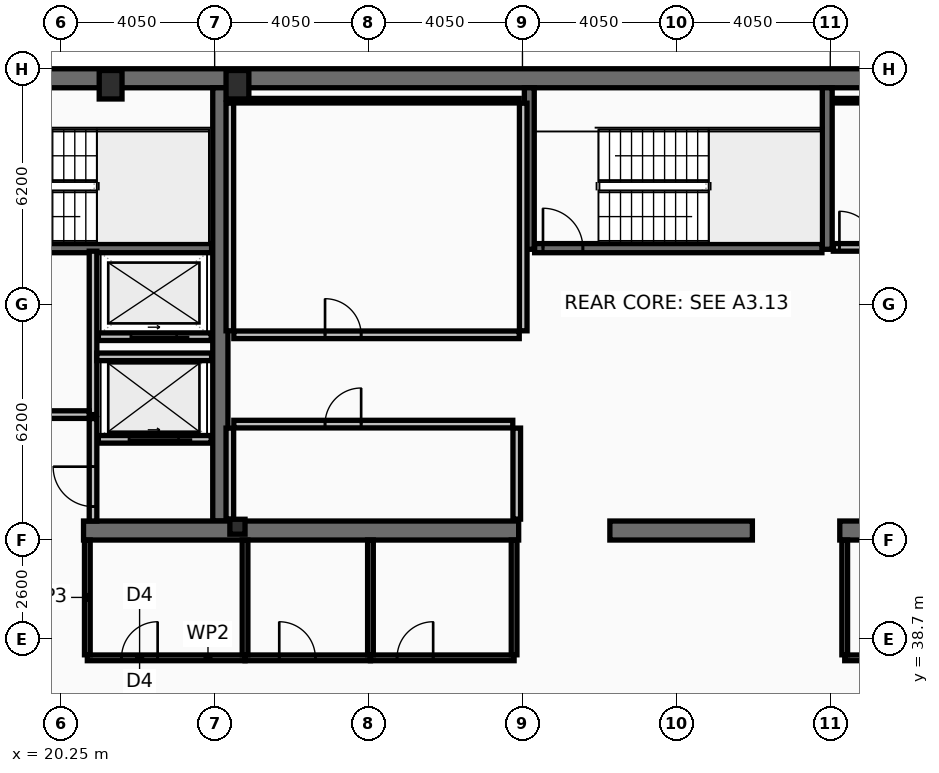
"""IFC4 building model, lengths in metres.
Left out: names, types, materials, properties, quantities, classifications, styles, units other than length and angle.
Written with IfcOpenShell. Run it as: python <this file> out.ifc"""

import sys

from ifc_helpers import new_model, si_unit, direction, frame, frame_2d, origin, origin_2d, place, context, subcontext, project, spatial, rectangle, hollow_rectangle, i_section, extrude, element, fill, save


model = new_model("IFC4")
c1 = context("Model", 3, precision=1e-05, world=origin(), true_north=direction((0.0, 1.0)))
c2 = subcontext(c1, "Body", "Model", "MODEL_VIEW")
j1 = project(units=[si_unit("LENGTHUNIT", "METRE"), si_unit("PLANEANGLEUNIT", "RADIAN")], contexts=[c1])
p1 = place(None, origin())
s1 = spatial("IfcSite", under=j1, at=p1, CompositionType="ELEMENT")
p2 = place(p1, origin())
s2 = spatial("IfcBuilding", under=s1, at=p2, CompositionType="ELEMENT")
p3 = place(p2, frame((0.0, 0.0, 269.8)))
s3 = spatial("IfcBuildingStorey", under=s2, at=p3, CompositionType="ELEMENT", Elevation=269.8)
p4 = place(p3, frame((16.2, 53.45, 0.0), z_axis=(0.0, 0.0, 1.0), x_axis=(1.0, 0.0, 0.0)))
e1 = element("IfcWall", 1, at=p4, inside=s3, PredefinedType="SHEAR", context=c2, shape_type="SweptSolid", body=[
    extrude(rectangle(XDim=40.5, YDim=0.5, at=frame_2d((20.25, 0.0))), origin(), (0.0, 0.0, 1.0), 3.44),
])
p5 = place(p3, frame((24.45, 41.8, 0.0), z_axis=(0.0, 0.0, 1.0), x_axis=(0.0, 1.0, 0.0)))
e2 = element("IfcWall", 2, at=p5, inside=s3, PredefinedType="SHEAR", context=c2, shape_type="SweptSolid", body=[
    extrude(rectangle(XDim=11.4, YDim=0.4, at=frame_2d((5.7, 0.0))), origin(), (0.0, 0.0, 1.0), 3.44),
])
p6 = place(p3, frame((32.3, 41.55, 0.0), z_axis=(0.0, 0.0, 1.0), x_axis=(-1.0, 0.0, 0.0)))
e3 = element("IfcWall", 3, at=p6, inside=s3, PredefinedType="SHEAR", context=c2, shape_type="SweptSolid", body=[
    extrude(rectangle(XDim=11.45, YDim=0.5, at=frame_2d((5.725, 0.0))), origin(), (0.0, 0.0, 1.0), 3.44),
])
p7 = place(p3, frame((38.45, 41.55, 0.0), z_axis=(0.0, 0.0, 1.0), x_axis=(-1.0, 0.0, 0.0)))
e4 = element("IfcWall", 4, at=p7, inside=s3, PredefinedType="SHEAR", context=c2, shape_type="SweptSolid", body=[
    extrude(rectangle(XDim=3.75, YDim=0.5, at=frame_2d((1.875, 0.0))), origin(), (0.0, 0.0, 1.0), 3.44),
])
p8 = place(p3, frame((52.05, 41.55, 0.0), z_axis=(0.0, 0.0, 1.0), x_axis=(-1.0, 0.0, 0.0)))
e5 = element("IfcWall", 5, at=p8, inside=s3, PredefinedType="SHEAR", context=c2, shape_type="SweptSolid", body=[
    extrude(rectangle(XDim=11.3, YDim=0.5, at=frame_2d((5.65, 0.0))), origin(), (0.0, 0.0, 1.0), 3.44),
])
for number, where, z_axis, x_axis in (
    (6, (32.58, 48.95, 0.0), (0.0, 0.0, 1.0), (0.0, 1.0, 0.0)),
    (7, (40.42, 48.95, 0.0), (0.0, 0.0, 1.0), (0.0, 1.0, 0.0)),
):
    element("IfcWall", number, at=place(p3, frame(where, z_axis=z_axis, x_axis=x_axis)), inside=s3, PredefinedType="SHEAR", context=c2, shape_type="SweptSolid", body=[
        extrude(rectangle(XDim=4.25, YDim=0.26, at=frame_2d((2.125, 0.0))), origin(), (0.0, 0.0, 1.0), 3.44),
    ])
p9 = place(p3, frame((16.7, 48.98, 0.0), z_axis=(0.0, 0.0, 1.0), x_axis=(1.0, 0.0, 0.0)))
e8 = element("IfcWall", 8, at=p9, inside=s3, PredefinedType="SHEAR", context=c2, shape_type="SweptSolid", body=[
    extrude(rectangle(XDim=7.52, YDim=0.24, at=frame_2d((3.76, 0.0))), origin(), (0.0, 0.0, 1.0), 3.44),
])
p10 = place(p9, frame((0.22, 0.0, 0.0)))
e9 = element("IfcOpeningElement", 9, at=p10, cuts=e8, PredefinedType="OPENING", context=c2, shape_type="SweptSolid", body=[
    extrude(rectangle(XDim=1.05, YDim=2.15, at=frame_2d((0.525, 1.075))), frame((0.0, 0.13, 0.0), z_axis=(0.0, -1.0, 0.0), x_axis=(1.0, 0.0, 0.0)), (0.0, 0.0, 1.0), 0.26),
])
p11 = place(p3, frame((32.72, 48.98, 0.0), z_axis=(0.0, 0.0, 1.0), x_axis=(1.0, 0.0, 0.0)))
e10 = element("IfcWall", 10, at=p11, inside=s3, PredefinedType="SHEAR", context=c2, shape_type="SweptSolid", body=[
    extrude(rectangle(XDim=7.56, YDim=0.24, at=frame_2d((3.78, 0.0))), origin(), (0.0, 0.0, 1.0), 3.44),
])
p12 = place(p11, frame((0.22, 0.0, 0.0)))
e11 = element("IfcOpeningElement", 11, at=p12, cuts=e10, PredefinedType="OPENING", context=c2, shape_type="SweptSolid", body=[
    extrude(rectangle(XDim=1.05, YDim=2.15, at=frame_2d((0.525, 1.075))), frame((0.0, 0.13, 0.0), z_axis=(0.0, -1.0, 0.0), x_axis=(1.0, 0.0, 0.0)), (0.0, 0.0, 1.0), 0.26),
])
for number, where, z_axis, x_axis in (
    (12, (21.562, 53.28, 0.0), (0.0, 0.0, 1.0), (1.0, 0.0, 0.0)),
    (13, (24.9, 53.28, 0.0), (0.0, 0.0, 1.0), (1.0, 0.0, 0.0)),
):
    element("IfcColumn", number, at=place(p3, frame(where, z_axis=z_axis, x_axis=x_axis)), inside=s3, PredefinedType="COLUMN", context=c2, shape_type="SweptSolid", body=[
        extrude(hollow_rectangle(XDim=0.6, YDim=0.75, WallThickness=0.045, at=origin_2d()), origin(), (0.0, 0.0, 1.0), 3.6),
    ])
p13 = place(p3, frame((24.9, 41.65, 0.0), z_axis=(0.0, 0.0, 1.0), x_axis=(1.0, 0.0, 0.0)))
e14 = element("IfcColumn", 14, at=p13, inside=s3, PredefinedType="COLUMN", context=c2, shape_type="SweptSolid", body=[
    extrude(i_section(OverallWidth=0.399, OverallDepth=0.393, WebThickness=0.023, FlangeThickness=0.037, at=origin_2d()), origin(), (0.0, 0.0, 1.0), 3.6),
])
p14 = place(p3, frame((24.21, 43.95, 0.0), z_axis=(0.0, 0.0, 1.0), x_axis=(-1.0, 0.0, 0.0)))
e15 = element("IfcWall", 15, at=p14, inside=s3, PredefinedType="PARTITIONING", context=c2, shape_type="SweptSolid", body=[
    extrude(rectangle(XDim=2.97, YDim=0.2, at=frame_2d((1.485, 0.0))), origin(), (0.0, 0.0, 1.0), 3.44),
])
p15 = place(p14, frame((0.86, 0.0, 0.0)))
e16 = element("IfcOpeningElement", 16, at=p15, cuts=e15, PredefinedType="OPENING", context=c2, shape_type="SweptSolid", body=[
    extrude(rectangle(XDim=1.3, YDim=2.18, at=frame_2d((0.65, 1.09))), frame((0.0, 0.11, 0.0), z_axis=(0.0, -1.0, 0.0), x_axis=(1.0, 0.0, 0.0)), (0.0, 0.0, 1.0), 0.22),
])
p16 = place(p3, frame((24.21, 46.65, 0.0), z_axis=(0.0, 0.0, 1.0), x_axis=(-1.0, 0.0, 0.0)))
e17 = element("IfcWall", 17, at=p16, inside=s3, PredefinedType="PARTITIONING", context=c2, shape_type="SweptSolid", body=[
    extrude(rectangle(XDim=2.97, YDim=0.2, at=frame_2d((1.485, 0.0))), origin(), (0.0, 0.0, 1.0), 3.44),
])
p17 = place(p16, frame((0.91, 0.0, 0.0)))
e18 = element("IfcOpeningElement", 18, at=p17, cuts=e17, PredefinedType="OPENING", context=c2, shape_type="SweptSolid", body=[
    extrude(rectangle(XDim=1.2, YDim=2.18, at=frame_2d((0.6, 1.09))), frame((0.0, 0.11, 0.0), z_axis=(0.0, -1.0, 0.0), x_axis=(1.0, 0.0, 0.0)), (0.0, 0.0, 1.0), 0.22),
])
p18 = place(p3, frame((21.1, 44.6, 0.0), z_axis=(0.0, 0.0, 1.0), x_axis=(0.0, 1.0, 0.0)))
e19 = element("IfcWall", 19, at=p18, inside=s3, PredefinedType="PARTITIONING", context=c2, shape_type="SweptSolid", body=[
    extrude(rectangle(XDim=4.3, YDim=0.2, at=frame_2d((2.15, 0.0))), origin(), (0.0, 0.0, 1.0), 3.44),
])
p19 = place(p3, frame((16.7, 44.6, 0.0), z_axis=(0.0, 0.0, 1.0), x_axis=(1.0, 0.0, 0.0)))
e20 = element("IfcWall", 20, at=p19, inside=s3, PredefinedType="PARTITIONING", context=c2, shape_type="SweptSolid", body=[
    extrude(rectangle(XDim=4.3, YDim=0.2, at=frame_2d((2.15, 0.0))), origin(), (0.0, 0.0, 1.0), 3.44),
])
p20 = place(p19, frame((1.25, 0.0, 0.0)))
e21 = element("IfcOpeningElement", 21, at=p20, cuts=e20, PredefinedType="OPENING", context=c2, shape_type="SweptSolid", body=[
    extrude(rectangle(XDim=1.05, YDim=2.15, at=frame_2d((0.525, 1.075))), frame((0.0, 0.11, 0.0), z_axis=(0.0, -1.0, 0.0), x_axis=(1.0, 0.0, 0.0)), (0.0, 0.0, 1.0), 0.22),
])
p21 = place(p3, frame((21.2, 46.12, 0.0), z_axis=(0.0, 0.0, 1.0), x_axis=(1.0, 0.0, 0.0)))
e22 = element("IfcWall", 22, at=p21, inside=s3, PredefinedType="PARTITIONING", context=c2, shape_type="SweptSolid", body=[
    extrude(rectangle(XDim=3.02, YDim=0.2, at=frame_2d((1.51, 0.0))), origin(), (0.0, 0.0, 1.0), 3.44),
])
p22 = place(p3, frame((21.1, 41.8, 0.0), z_axis=(0.0, 0.0, 1.0), x_axis=(0.0, 1.0, 0.0)))
e23 = element("IfcWall", 23, at=p22, inside=s3, PredefinedType="PARTITIONING", context=c2, shape_type="SweptSolid", body=[
    extrude(rectangle(XDim=2.695, YDim=0.2, at=frame_2d((1.348, 0.0))), origin(), (0.0, 0.0, 1.0), 3.44),
])
p23 = place(p22, frame((0.38, 0.0, 0.0)))
e24 = element("IfcOpeningElement", 24, at=p23, cuts=e23, PredefinedType="OPENING", context=c2, shape_type="SweptSolid", body=[
    extrude(rectangle(XDim=1.05, YDim=2.15, at=frame_2d((0.525, 1.075))), frame((0.0, 0.11, 0.0), z_axis=(0.0, -1.0, 0.0), x_axis=(1.0, 0.0, 0.0)), (0.0, 0.0, 1.0), 0.22),
])
for number, where, z_axis, x_axis in (
    (25, (24.7, 46.805, 0.0), (0.0, 0.0, 1.0), (0.0, 1.0, 0.0)),
    (26, (32.42, 46.805, 0.0), (0.0, 0.0, 1.0), (0.0, 1.0, 0.0)),
):
    element("IfcWall", number, at=place(p3, frame(where, z_axis=z_axis, x_axis=x_axis)), inside=s3, PredefinedType="PARTITIONING", context=c2, shape_type="SweptSolid", body=[
        extrude(rectangle(XDim=5.99, YDim=0.2, at=frame_2d((2.995, 0.0))), origin(), (0.0, 0.0, 1.0), 3.44),
    ])
p24 = place(p3, frame((24.805, 52.86, 0.0), z_axis=(0.0, 0.0, 1.0), x_axis=(1.0, 0.0, 0.0)))
e27 = element("IfcWall", 27, at=p24, inside=s3, PredefinedType="PARTITIONING", context=c2, shape_type="SweptSolid", body=[
    extrude(rectangle(XDim=7.51, YDim=0.12, at=frame_2d((3.755, 0.0))), origin(), (0.0, 0.0, 1.0), 3.44),
])
p25 = place(p3, frame((24.805, 46.7, 0.0), z_axis=(0.0, 0.0, 1.0), x_axis=(1.0, 0.0, 0.0)))
e28 = element("IfcWall", 28, at=p25, inside=s3, PredefinedType="PARTITIONING", context=c2, shape_type="SweptSolid", body=[
    extrude(rectangle(XDim=7.51, YDim=0.2, at=frame_2d((3.755, 0.0))), origin(), (0.0, 0.0, 1.0), 3.44),
])
p26 = place(p25, frame((2.4, 0.0, 0.0)))
e29 = element("IfcOpeningElement", 29, at=p26, cuts=e28, PredefinedType="OPENING", context=c2, shape_type="SweptSolid", body=[
    extrude(rectangle(XDim=0.95, YDim=2.1, at=frame_2d((0.475, 1.05))), frame((0.0, 0.11, 0.0), z_axis=(0.0, -1.0, 0.0), x_axis=(1.0, 0.0, 0.0)), (0.0, 0.0, 1.0), 0.22),
])
for number, where, z_axis, x_axis in (
    (30, (24.7, 41.85, 0.0), (0.0, 0.0, 1.0), (0.0, 1.0, 0.0)),
    (31, (32.25, 41.85, 0.0), (0.0, 0.0, 1.0), (0.0, 1.0, 0.0)),
):
    element("IfcWall", number, at=place(p3, frame(where, z_axis=z_axis, x_axis=x_axis)), inside=s3, PredefinedType="PARTITIONING", context=c2, shape_type="SweptSolid", body=[
        extrude(rectangle(XDim=2.395, YDim=0.2, at=frame_2d((1.198, 0.0))), origin(), (0.0, 0.0, 1.0), 3.44),
    ])
p27 = place(p3, frame((24.805, 44.35, 0.0), z_axis=(0.0, 0.0, 1.0), x_axis=(1.0, 0.0, 0.0)))
e32 = element("IfcWall", 32, at=p27, inside=s3, PredefinedType="PARTITIONING", context=c2, shape_type="SweptSolid", body=[
    extrude(rectangle(XDim=7.34, YDim=0.2, at=frame_2d((3.67, 0.0))), origin(), (0.0, 0.0, 1.0), 3.44),
])
p28 = place(p27, frame((2.4, 0.0, 0.0)))
e33 = element("IfcOpeningElement", 33, at=p28, cuts=e32, PredefinedType="OPENING", context=c2, shape_type="SweptSolid", body=[
    extrude(rectangle(XDim=0.95, YDim=2.1, at=frame_2d((0.475, 1.05))), frame((0.0, 0.11, 0.0), z_axis=(0.0, -1.0, 0.0), x_axis=(1.0, 0.0, 0.0)), (0.0, 0.0, 1.0), 0.22),
])
p29 = place(p3, frame((40.58, 52.86, 0.0), z_axis=(0.0, 0.0, 1.0), x_axis=(1.0, 0.0, 0.0)))
e34 = element("IfcWall", 34, at=p29, inside=s3, PredefinedType="PARTITIONING", context=c2, shape_type="SweptSolid", body=[
    extrude(rectangle(XDim=7.56, YDim=0.12, at=frame_2d((3.78, 0.0))), origin(), (0.0, 0.0, 1.0), 3.44),
])
p30 = place(p3, frame((40.58, 49.0, 0.0), z_axis=(0.0, 0.0, 1.0), x_axis=(1.0, 0.0, 0.0)))
e35 = element("IfcWall", 35, at=p30, inside=s3, PredefinedType="PARTITIONING", context=c2, shape_type="SweptSolid", body=[
    extrude(rectangle(XDim=7.56, YDim=0.2, at=frame_2d((3.78, 0.0))), origin(), (0.0, 0.0, 1.0), 3.44),
])
p31 = place(p30, frame((0.16, 0.0, 0.0)))
e36 = element("IfcOpeningElement", 36, at=p31, cuts=e35, PredefinedType="OPENING", context=c2, shape_type="SweptSolid", body=[
    extrude(rectangle(XDim=0.95, YDim=2.1, at=frame_2d((0.475, 1.05))), frame((0.0, 0.11, 0.0), z_axis=(0.0, -1.0, 0.0), x_axis=(1.0, 0.0, 0.0)), (0.0, 0.0, 1.0), 0.22),
])
p32 = place(p3, frame((20.95, 38.2, 0.0), z_axis=(0.0, 0.0, 1.0), x_axis=(1.0, 0.0, 0.0)))
e37 = element("IfcWall", 37, at=p32, inside=s3, PredefinedType="PARTITIONING", context=c2, shape_type="SweptSolid", body=[
    extrude(rectangle(XDim=4.15, YDim=0.15, at=frame_2d((2.075, 0.0))), origin(), (0.0, 0.0, 1.0), 2.78),
])
p33 = place(p32, frame((0.9, 0.0, 0.0)))
e38 = element("IfcOpeningElement", 38, at=p33, cuts=e37, PredefinedType="OPENING", context=c2, shape_type="SweptSolid", body=[
    extrude(rectangle(XDim=0.95, YDim=2.05, at=frame_2d((0.475, 1.025))), frame((0.0, 0.085, 0.0), z_axis=(0.0, -1.0, 0.0), x_axis=(1.0, 0.0, 0.0)), (0.0, 0.0, 1.0), 0.17),
])
p34 = place(p3, frame((25.1, 38.2, 0.0), z_axis=(0.0, 0.0, 1.0), x_axis=(1.0, 0.0, 0.0)))
e39 = element("IfcWall", 39, at=p34, inside=s3, PredefinedType="PARTITIONING", context=c2, shape_type="SweptSolid", body=[
    extrude(rectangle(XDim=3.3, YDim=0.15, at=frame_2d((1.65, 0.0))), origin(), (0.0, 0.0, 1.0), 2.78),
])
p35 = place(p34, frame((0.9, 0.0, 0.0)))
e40 = element("IfcOpeningElement", 40, at=p35, cuts=e39, PredefinedType="OPENING", context=c2, shape_type="SweptSolid", body=[
    extrude(rectangle(XDim=0.95, YDim=2.05, at=frame_2d((0.475, 1.025))), frame((0.0, 0.085, 0.0), z_axis=(0.0, -1.0, 0.0), x_axis=(1.0, 0.0, 0.0)), (0.0, 0.0, 1.0), 0.17),
])
p36 = place(p3, frame((28.4, 38.2, 0.0), z_axis=(0.0, 0.0, 1.0), x_axis=(1.0, 0.0, 0.0)))
e41 = element("IfcWall", 41, at=p36, inside=s3, PredefinedType="PARTITIONING", context=c2, shape_type="SweptSolid", body=[
    extrude(rectangle(XDim=3.78, YDim=0.15, at=frame_2d((1.89, 0.0))), origin(), (0.0, 0.0, 1.0), 2.78),
])
p37 = place(p36, frame((0.7, 0.0, 0.0)))
e42 = element("IfcOpeningElement", 42, at=p37, cuts=e41, PredefinedType="OPENING", context=c2, shape_type="SweptSolid", body=[
    extrude(rectangle(XDim=0.95, YDim=2.05, at=frame_2d((0.475, 1.025))), frame((0.0, 0.085, 0.0), z_axis=(0.0, -1.0, 0.0), x_axis=(1.0, 0.0, 0.0)), (0.0, 0.0, 1.0), 0.17),
])
p38 = place(p3, frame((20.95, 38.28, 0.0), z_axis=(0.0, 0.0, 1.0), x_axis=(0.0, 1.0, 0.0)))
e43 = element("IfcWall", 43, at=p38, inside=s3, PredefinedType="PARTITIONING", context=c2, shape_type="SweptSolid", body=[
    extrude(rectangle(XDim=3.02, YDim=0.15, at=frame_2d((1.51, 0.0))), origin(), (0.0, 0.0, 1.0), 3.44),
])
p39 = place(p3, frame((25.1, 38.28, 0.0), z_axis=(0.0, 0.0, 1.0), x_axis=(0.0, 1.0, 0.0)))
e44 = element("IfcWall", 44, at=p39, inside=s3, PredefinedType="PARTITIONING", context=c2, shape_type="SweptSolid", body=[
    extrude(rectangle(XDim=3.02, YDim=0.15, at=frame_2d((1.51, 0.0))), origin(), (0.0, 0.0, 1.0), 2.78),
])
for number, where, z_axis, x_axis in (
    (45, (28.4, 38.28, 0.0), (0.0, 0.0, 1.0), (0.0, 1.0, 0.0)),
    (46, (32.18, 38.28, 0.0), (0.0, 0.0, 1.0), (0.0, 1.0, 0.0)),
):
    element("IfcWall", number, at=place(p3, frame(where, z_axis=z_axis, x_axis=x_axis)), inside=s3, PredefinedType="PARTITIONING", context=c2, shape_type="SweptSolid", body=[
        extrude(rectangle(XDim=3.02, YDim=0.15, at=frame_2d((1.51, 0.0))), origin(), (0.0, 0.0, 1.0), 3.44),
    ])
p40 = place(p3, frame((40.88, 38.2, 0.0), z_axis=(0.0, 0.0, 1.0), x_axis=(1.0, 0.0, 0.0)))
e47 = element("IfcWall", 47, at=p40, inside=s3, PredefinedType="PARTITIONING", context=c2, shape_type="SweptSolid", body=[
    extrude(rectangle(XDim=3.92, YDim=0.15, at=frame_2d((1.96, 0.0))), origin(), (0.0, 0.0, 1.0), 2.78),
])
p41 = place(p40, frame((1.1, 0.0, 0.0)))
e48 = element("IfcOpeningElement", 48, at=p41, cuts=e47, PredefinedType="OPENING", context=c2, shape_type="SweptSolid", body=[
    extrude(rectangle(XDim=0.9, YDim=2.05, at=frame_2d((0.45, 1.025))), frame((0.0, 0.085, 0.0), z_axis=(0.0, -1.0, 0.0), x_axis=(1.0, 0.0, 0.0)), (0.0, 0.0, 1.0), 0.17),
])
p42 = place(p3, frame((40.88, 38.28, 0.0), z_axis=(0.0, 0.0, 1.0), x_axis=(0.0, 1.0, 0.0)))
e49 = element("IfcWall", 49, at=p42, inside=s3, PredefinedType="PARTITIONING", context=c2, shape_type="SweptSolid", body=[
    extrude(rectangle(XDim=3.02, YDim=0.15, at=frame_2d((1.51, 0.0))), origin(), (0.0, 0.0, 1.0), 3.44),
])
p43 = place(p12, origin())
e50 = element("IfcDoor", 50, at=p43, inside=s3, OperationType="SINGLE_SWING_LEFT", PredefinedType="DOOR", context=c2, shape_type="SweptSolid", body=[
    extrude(rectangle(XDim=1.05, YDim=2.15, at=frame_2d((0.525, 1.075))), frame((0.0, 0.025, 0.0), z_axis=(0.0, -1.0, 0.0), x_axis=(1.0, 0.0, 0.0)), (0.0, 0.0, 1.0), 0.05),
])
fill(e11, e50)
p44 = place(p15, origin())
e51 = element("IfcDoor", 51, at=p44, inside=s3, OperationType="SLIDING_TO_LEFT", PredefinedType="DOOR", context=c2, shape_type="SweptSolid", body=[
    extrude(rectangle(XDim=1.3, YDim=2.18, at=frame_2d((0.65, 1.09))), frame((0.0, 0.025, 0.0), z_axis=(0.0, -1.0, 0.0), x_axis=(1.0, 0.0, 0.0)), (0.0, 0.0, 1.0), 0.05),
])
fill(e16, e51)
p45 = place(p17, origin())
e52 = element("IfcDoor", 52, at=p45, inside=s3, OperationType="SLIDING_TO_LEFT", PredefinedType="DOOR", context=c2, shape_type="SweptSolid", body=[
    extrude(rectangle(XDim=1.2, YDim=2.18, at=frame_2d((0.6, 1.09))), frame((0.0, 0.025, 0.0), z_axis=(0.0, -1.0, 0.0), x_axis=(1.0, 0.0, 0.0)), (0.0, 0.0, 1.0), 0.05),
])
fill(e18, e52)
p46 = place(p23, origin())
e53 = element("IfcDoor", 53, at=p46, inside=s3, OperationType="SINGLE_SWING_RIGHT", PredefinedType="DOOR", context=c2, shape_type="SweptSolid", body=[
    extrude(rectangle(XDim=1.05, YDim=2.15, at=frame_2d((0.525, 1.075))), frame((0.0, 0.025, 0.0), z_axis=(0.0, -1.0, 0.0), x_axis=(1.0, 0.0, 0.0)), (0.0, 0.0, 1.0), 0.05),
])
fill(e24, e53)
p47 = place(p26, origin())
e54 = element("IfcDoor", 54, at=p47, inside=s3, OperationType="SINGLE_SWING_LEFT", PredefinedType="DOOR", context=c2, shape_type="SweptSolid", body=[
    extrude(rectangle(XDim=0.95, YDim=2.1, at=frame_2d((0.475, 1.05))), frame((0.0, 0.025, 0.0), z_axis=(0.0, -1.0, 0.0), x_axis=(1.0, 0.0, 0.0)), (0.0, 0.0, 1.0), 0.05),
])
fill(e29, e54)
p48 = place(p28, origin())
e55 = element("IfcDoor", 55, at=p48, inside=s3, OperationType="SINGLE_SWING_RIGHT", PredefinedType="DOOR", context=c2, shape_type="SweptSolid", body=[
    extrude(rectangle(XDim=0.95, YDim=2.1, at=frame_2d((0.475, 1.05))), frame((0.0, 0.025, 0.0), z_axis=(0.0, -1.0, 0.0), x_axis=(1.0, 0.0, 0.0)), (0.0, 0.0, 1.0), 0.05),
])
fill(e33, e55)
p49 = place(p31, origin())
e56 = element("IfcDoor", 56, at=p49, inside=s3, OperationType="SINGLE_SWING_LEFT", PredefinedType="DOOR", context=c2, shape_type="SweptSolid", body=[
    extrude(rectangle(XDim=0.95, YDim=2.1, at=frame_2d((0.475, 1.05))), frame((0.0, 0.025, 0.0), z_axis=(0.0, -1.0, 0.0), x_axis=(1.0, 0.0, 0.0)), (0.0, 0.0, 1.0), 0.05),
])
fill(e36, e56)
p50 = place(p33, origin())
e57 = element("IfcDoor", 57, at=p50, inside=s3, OperationType="SINGLE_SWING_RIGHT", PredefinedType="DOOR", context=c2, shape_type="SweptSolid", body=[
    extrude(rectangle(XDim=0.95, YDim=2.05, at=frame_2d((0.475, 1.025))), frame((0.0, 0.025, 0.0), z_axis=(0.0, -1.0, 0.0), x_axis=(1.0, 0.0, 0.0)), (0.0, 0.0, 1.0), 0.05),
])
fill(e38, e57)
p51 = place(p35, origin())
e58 = element("IfcDoor", 58, at=p51, inside=s3, OperationType="SINGLE_SWING_LEFT", PredefinedType="DOOR", context=c2, shape_type="SweptSolid", body=[
    extrude(rectangle(XDim=0.95, YDim=2.05, at=frame_2d((0.475, 1.025))), frame((0.0, 0.025, 0.0), z_axis=(0.0, -1.0, 0.0), x_axis=(1.0, 0.0, 0.0)), (0.0, 0.0, 1.0), 0.05),
])
fill(e40, e58)
p52 = place(p37, origin())
e59 = element("IfcDoor", 59, at=p52, inside=s3, OperationType="SINGLE_SWING_RIGHT", PredefinedType="DOOR", context=c2, shape_type="SweptSolid", body=[
    extrude(rectangle(XDim=0.95, YDim=2.05, at=frame_2d((0.475, 1.025))), frame((0.0, 0.025, 0.0), z_axis=(0.0, -1.0, 0.0), x_axis=(1.0, 0.0, 0.0)), (0.0, 0.0, 1.0), 0.05),
])
fill(e42, e59)
save(model, sys.argv[1])
